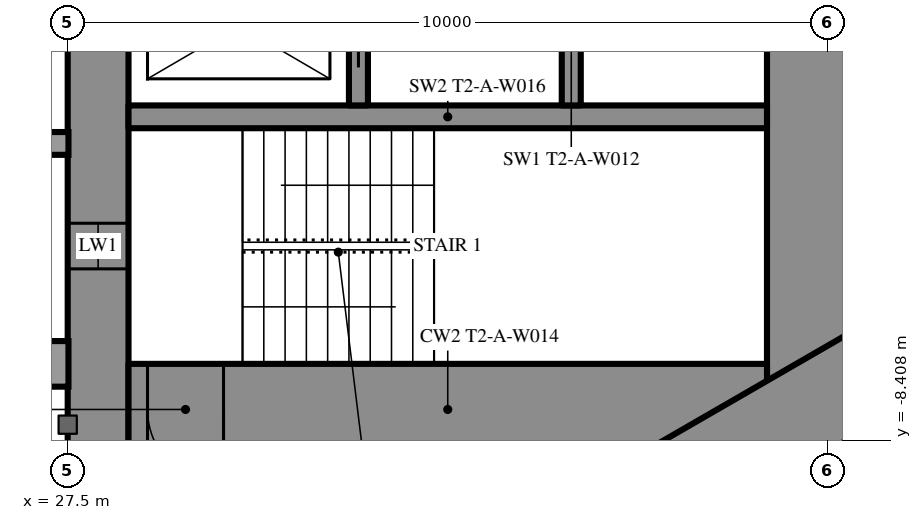
"""IFC4 building model, lengths in metres.
Left out: names, types, materials, properties, quantities, classifications, styles, units other than length and angle.
Written with IfcOpenShell. Run it as: python <this file> out.ifc"""

import sys

from ifc_helpers import new_model, si_unit, direction, frame, frame_2d, origin, place, context, subcontext, project, spatial, rectangle, extrude, element, fill, save


model = new_model("IFC4")
c1 = context("Model", 3, precision=1e-05, world=origin(), true_north=direction((0.0, 1.0)))
c2 = subcontext(c1, "Body", "Model", "MODEL_VIEW")
j1 = project(units=[si_unit("LENGTHUNIT", "METRE"), si_unit("PLANEANGLEUNIT", "RADIAN")], contexts=[c1])
p1 = place(None, origin())
s1 = spatial("IfcSite", under=j1, at=p1, CompositionType="ELEMENT")
p2 = place(p1, origin())
s2 = spatial("IfcBuilding", under=s1, at=p2, CompositionType="ELEMENT")
p3 = place(p2, frame((0.0, 0.0, 60.0)))
s3 = spatial("IfcBuildingStorey", under=s2, at=p3, CompositionType="ELEMENT", Elevation=60.0)
p4 = place(p3, frame((27.9, -8.6, 0.0), z_axis=(0.0, 0.0, 1.0), x_axis=(0.0, 1.0, 0.0)))
e1 = element("IfcWall", 1, at=p4, inside=s3, PredefinedType="SHEAR", context=c2, shape_type="SweptSolid", body=[
    extrude(rectangle(XDim=17.2, YDim=0.8, at=frame_2d((8.6, 0.0))), origin(), (0.0, 0.0, 1.0), 3.5),
])
p5 = place(p4, frame((2.45, 0.0, 0.6)))
e2 = element("IfcOpeningElement", 2, at=p5, cuts=e1, PredefinedType="OPENING", context=c2, shape_type="SweptSolid", body=[
    extrude(rectangle(XDim=0.6, YDim=2.1, at=frame_2d((0.3, 1.05))), frame((0.0, 0.41, 0.0), z_axis=(0.0, -1.0, 0.0), x_axis=(1.0, 0.0, 0.0)), (0.0, 0.0, 1.0), 0.82),
])
p6 = place(p4, frame((14.15, 0.0, 0.6)))
e3 = element("IfcOpeningElement", 3, at=p6, cuts=e1, PredefinedType="OPENING", context=c2, shape_type="SweptSolid", body=[
    extrude(rectangle(XDim=0.6, YDim=2.1, at=frame_2d((0.3, 1.05))), frame((0.0, 0.41, 0.0), z_axis=(0.0, -1.0, 0.0), x_axis=(1.0, 0.0, 0.0)), (0.0, 0.0, 1.0), 0.82),
])
p7 = place(p3, frame((37.3, -8.6, 0.0), z_axis=(0.0, 0.0, 1.0), x_axis=(0.0, 1.0, 0.0)))
e4 = element("IfcWall", 4, at=p7, inside=s3, PredefinedType="SHEAR", context=c2, shape_type="SweptSolid", body=[
    extrude(rectangle(XDim=17.2, YDim=1.2, at=frame_2d((8.6, 0.0))), origin(), (0.0, 0.0, 1.0), 3.5),
])
p8 = place(p7, frame((7.7, 0.0, 0.0)))
e5 = element("IfcOpeningElement", 5, at=p8, cuts=e4, PredefinedType="OPENING", context=c2, shape_type="SweptSolid", body=[
    extrude(rectangle(XDim=1.8, YDim=2.2, at=frame_2d((0.9, 1.1))), frame((0.0, 0.61, 0.0), z_axis=(0.0, -1.0, 0.0), x_axis=(1.0, 0.0, 0.0)), (0.0, 0.0, 1.0), 1.22),
])
p9 = place(p3, frame((28.3, -8.0, 0.0), z_axis=(0.0, 0.0, 1.0), x_axis=(1.0, 0.0, 0.0)))
e6 = element("IfcWall", 6, at=p9, inside=s3, PredefinedType="SHEAR", context=c2, shape_type="SweptSolid", body=[
    extrude(rectangle(XDim=8.4, YDim=1.2, at=frame_2d((4.2, 0.0))), origin(), (0.0, 0.0, 1.0), 3.5),
])
p10 = place(p9, frame((0.25, 0.0, 0.0)))
e7 = element("IfcOpeningElement", 7, at=p10, cuts=e6, PredefinedType="OPENING", context=c2, shape_type="SweptSolid", body=[
    extrude(rectangle(XDim=1.0, YDim=2.2, at=frame_2d((0.5, 1.1))), frame((0.0, 0.61, 0.0), z_axis=(0.0, -1.0, 0.0), x_axis=(1.0, 0.0, 0.0)), (0.0, 0.0, 1.0), 1.22),
])
p11 = place(p3, frame((28.3, -4.15, 0.0), z_axis=(0.0, 0.0, 1.0), x_axis=(1.0, 0.0, 0.0)))
e8 = element("IfcWall", 8, at=p11, inside=s3, PredefinedType="SHEAR", context=c2, shape_type="SweptSolid", body=[
    extrude(rectangle(XDim=8.4, YDim=0.3, at=frame_2d((4.2, 0.0))), origin(), (0.0, 0.0, 1.0), 3.5),
])
p12 = place(p3, frame((31.325, -4.0, 0.0), z_axis=(0.0, 0.0, 1.0), x_axis=(0.0, 1.0, 0.0)))
e9 = element("IfcWall", 9, at=p12, inside=s3, PredefinedType="SHEAR", context=c2, shape_type="SweptSolid", body=[
    extrude(rectangle(XDim=2.1, YDim=0.25, at=frame_2d((1.05, 0.0))), origin(), (0.0, 0.0, 1.0), 3.5),
])
p13 = place(p12, frame((0.5, 0.0, 0.0)))
e10 = element("IfcOpeningElement", 10, at=p13, cuts=e9, PredefinedType="OPENING", context=c2, shape_type="SweptSolid", body=[
    extrude(rectangle(XDim=1.1, YDim=2.2, at=frame_2d((0.55, 1.1))), frame((0.0, 0.135, 0.0), z_axis=(0.0, -1.0, 0.0), x_axis=(1.0, 0.0, 0.0)), (0.0, 0.0, 1.0), 0.27),
])
p14 = place(p3, frame((34.125, -4.0, 0.0), z_axis=(0.0, 0.0, 1.0), x_axis=(0.0, 1.0, 0.0)))
e11 = element("IfcWall", 11, at=p14, inside=s3, PredefinedType="SHEAR", context=c2, shape_type="SweptSolid", body=[
    extrude(rectangle(XDim=2.35, YDim=0.25, at=frame_2d((1.175, 0.0))), origin(), (0.0, 0.0, 1.0), 3.5),
])
p15 = place(p14, frame((0.875, 0.0, 0.0)))
e12 = element("IfcOpeningElement", 12, at=p15, cuts=e11, PredefinedType="OPENING", context=c2, shape_type="SweptSolid", body=[
    extrude(rectangle(XDim=0.6, YDim=2.0, at=frame_2d((0.3, 1.0))), frame((0.0, 0.135, 0.0), z_axis=(0.0, -1.0, 0.0), x_axis=(1.0, 0.0, 0.0)), (0.0, 0.0, 1.0), 0.27),
])
p16 = place(p3, frame((27.2, -13.8, 0.0), z_axis=(0.0, 0.0, 1.0), x_axis=(0.866027159892, 0.499996958321, 0.0)))
e13 = element("IfcWall", 13, at=p16, inside=s3, PredefinedType="SHEAR", context=c2, shape_type="SweptSolid", body=[
    extrude(rectangle(XDim=27.947, YDim=1.2, at=frame_2d((13.973, 0.0))), origin(), (0.0, 0.0, 1.0), 3.5),
])
p17 = place(p16, frame((4.6, 0.0, 0.0)))
e14 = element("IfcOpeningElement", 14, at=p17, cuts=e13, PredefinedType="OPENING", context=c2, shape_type="SweptSolid", body=[
    extrude(rectangle(XDim=1.0, YDim=2.2, at=frame_2d((0.5, 1.1))), frame((0.0, 0.61, 0.0), z_axis=(0.0, -1.0, 0.0), x_axis=(1.0, 0.0, 0.0)), (0.0, 0.0, 1.0), 1.22),
])
p18 = place(p16, frame((13.395, 0.0, 0.0)))
e15 = element("IfcOpeningElement", 15, at=p18, cuts=e13, PredefinedType="OPENING", context=c2, shape_type="SweptSolid", body=[
    extrude(rectangle(XDim=1.8, YDim=2.2, at=frame_2d((0.9, 1.1))), frame((0.0, 0.61, 0.0), z_axis=(0.0, -1.0, 0.0), x_axis=(1.0, 0.0, 0.0)), (0.0, 0.0, 1.0), 1.22),
])
p19 = place(p10, origin())
e16 = element("IfcDoor", 16, at=p19, inside=s3, OperationType="SINGLE_SWING_RIGHT", PredefinedType="DOOR", context=c2, shape_type="SweptSolid", body=[
    extrude(rectangle(XDim=1.0, YDim=2.2, at=frame_2d((0.5, 1.1))), frame((0.0, 0.025, 0.0), z_axis=(0.0, -1.0, 0.0), x_axis=(1.0, 0.0, 0.0)), (0.0, 0.0, 1.0), 0.05),
])
fill(e7, e16)
p20 = place(p13, origin())
e17 = element("IfcDoor", 17, at=p20, inside=s3, OperationType="SLIDING_TO_LEFT", PredefinedType="USERDEFINED", context=c2, shape_type="SweptSolid", body=[
    extrude(rectangle(XDim=1.1, YDim=2.2, at=frame_2d((0.55, 1.1))), frame((0.0, 0.025, 0.0), z_axis=(0.0, -1.0, 0.0), x_axis=(1.0, 0.0, 0.0)), (0.0, 0.0, 1.0), 0.05),
])
fill(e10, e17)
p21 = place(p5, origin())
e18 = element("IfcWindow", 18, at=p21, inside=s3, PartitioningType="SINGLE_PANEL", PredefinedType="WINDOW", context=c2, shape_type="SweptSolid", body=[
    extrude(rectangle(XDim=0.6, YDim=2.1, at=frame_2d((0.3, 1.05))), frame((0.0, 0.03, 0.0), z_axis=(0.0, -1.0, 0.0), x_axis=(1.0, 0.0, 0.0)), (0.0, 0.0, 1.0), 0.06),
])
fill(e2, e18)
save(model, sys.argv[1])
